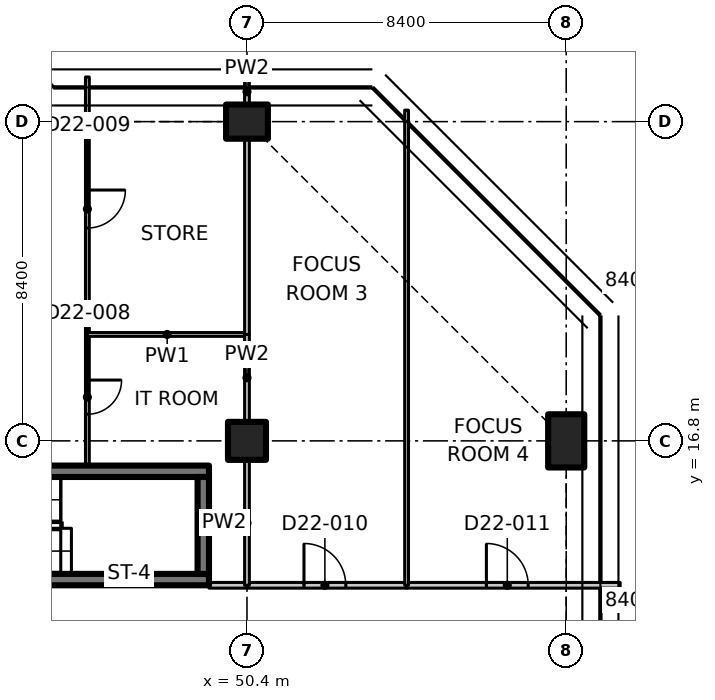
"""IFC4 building model, lengths in metres.
Left out: names, types, materials, properties, quantities, classifications, styles, units other than length and angle.
Written with IfcOpenShell. Run it as: python <this file> out.ifc"""

import sys

from ifc_helpers import new_model, si_unit, direction, frame, frame_2d, origin, origin_2d, place, context, subcontext, project, spatial, polyline, rectangle, outline, extrude, element, fill, save


model = new_model("IFC4")
c1 = context("Model", 3, precision=1e-05, world=origin(), true_north=direction((0.0, 1.0)))
c2 = subcontext(c1, "Body", "Model", "MODEL_VIEW")
j1 = project(units=[si_unit("LENGTHUNIT", "METRE"), si_unit("PLANEANGLEUNIT", "RADIAN")], contexts=[c1])
p1 = place(None, origin())
s1 = spatial("IfcSite", under=j1, at=p1, CompositionType="ELEMENT")
p2 = place(p1, origin())
s2 = spatial("IfcBuilding", under=s1, at=p2, CompositionType="ELEMENT")
p3 = place(p2, frame((0.0, 0.0, 177.6)))
s3 = spatial("IfcBuildingStorey", under=s2, at=p3, CompositionType="ELEMENT", Elevation=177.6)
p4 = place(p3, frame((50.4, 16.8, 0.0), z_axis=(0.0, 0.0, 1.0), x_axis=(1.0, 0.0, 0.0)))
e1 = element("IfcColumn", 1, at=p4, inside=s3, PredefinedType="COLUMN", context=c2, shape_type="SweptSolid", body=[
    extrude(rectangle(XDim=1.0, YDim=1.0, at=origin_2d()), origin(), (0.0, 0.0, 1.0), 3.35),
])
p5 = place(p3, frame((50.4, 25.2, 0.0), z_axis=(0.0, 0.0, 1.0), x_axis=(0.0, 1.0, 0.0)))
e2 = element("IfcColumn", 2, at=p5, inside=s3, PredefinedType="COLUMN", context=c2, shape_type="SweptSolid", body=[
    extrude(rectangle(XDim=0.9, YDim=1.1, at=origin_2d()), origin(), (0.0, 0.0, 1.0), 3.35),
])
p6 = place(p3, frame((58.8, 16.8, 0.0), z_axis=(0.0, 0.0, 1.0), x_axis=(1.0, 0.0, 0.0)))
e3 = element("IfcColumn", 3, at=p6, inside=s3, PredefinedType="COLUMN", context=c2, shape_type="SweptSolid", body=[
    extrude(rectangle(XDim=0.95, YDim=1.4, at=origin_2d()), origin(), (0.0, 0.0, 1.0), 3.35),
])
p7 = place(p3, frame((49.4, 13.15, 0.0), z_axis=(0.0, 0.0, 1.0), x_axis=(-1.0, 0.0, 0.0)))
e4 = element("IfcWall", 4, at=p7, inside=s3, PredefinedType="SHEAR", context=c2, shape_type="SweptSolid", body=[
    extrude(rectangle(XDim=8.2, YDim=0.3, at=frame_2d((4.1, 0.0))), origin(), (0.0, 0.0, 1.0), 3.35),
])
p8 = place(p7, frame((6.8, 0.0, 0.0)))
e5 = element("IfcOpeningElement", 5, at=p8, cuts=e4, PredefinedType="OPENING", context=c2, shape_type="SweptSolid", body=[
    extrude(rectangle(XDim=1.0, YDim=2.1, at=frame_2d((0.5, 1.05))), frame((0.0, 0.16, 0.0), z_axis=(0.0, -1.0, 0.0), x_axis=(1.0, 0.0, 0.0)), (0.0, 0.0, 1.0), 0.32),
])
p9 = place(p3, frame((41.2, 16.0, 0.0), z_axis=(0.0, 0.0, 1.0), x_axis=(1.0, 0.0, 0.0)))
e6 = element("IfcWall", 6, at=p9, inside=s3, PredefinedType="SHEAR", context=c2, shape_type="SweptSolid", body=[
    extrude(rectangle(XDim=8.2, YDim=0.3, at=frame_2d((4.1, 0.0))), origin(), (0.0, 0.0, 1.0), 3.35),
])
p10 = place(p3, frame((49.25, 13.3, 0.0), z_axis=(0.0, 0.0, 1.0), x_axis=(0.0, 1.0, 0.0)))
e7 = element("IfcWall", 7, at=p10, inside=s3, PredefinedType="SHEAR", context=c2, shape_type="SweptSolid", body=[
    extrude(rectangle(XDim=2.55, YDim=0.3, at=frame_2d((1.275, 0.0))), origin(), (0.0, 0.0, 1.0), 3.35),
])
p11 = place(p3, frame((49.4, 13.0, 0.0), z_axis=(0.0, 0.0, 1.0), x_axis=(1.0, 0.0, 0.0)))
e8 = element("IfcWall", 8, at=p11, inside=s3, PredefinedType="PARTITIONING", context=c2, shape_type="SweptSolid", body=[
    extrude(rectangle(XDim=1.0, YDim=0.15, at=frame_2d((0.5, 0.0))), origin(), (0.0, 0.0, 1.0), 3.33),
])
p12 = place(p3, frame((50.4, 13.0, 0.0), z_axis=(0.0, 0.0, 1.0), x_axis=(1.0, 0.0, 0.0)))
e9 = element("IfcWall", 9, at=p12, inside=s3, PredefinedType="PARTITIONING", context=c2, shape_type="SweptSolid", body=[
    extrude(rectangle(XDim=4.2, YDim=0.15, at=frame_2d((2.1, 0.0))), origin(), (0.0, 0.0, 1.0), 3.33),
])
p13 = place(p12, frame((1.5, 0.0, 0.0)))
e10 = element("IfcOpeningElement", 10, at=p13, cuts=e9, PredefinedType="OPENING", context=c2, shape_type="SweptSolid", body=[
    extrude(rectangle(XDim=1.1, YDim=2.1, at=frame_2d((0.55, 1.05))), frame((0.0, 0.085, 0.0), z_axis=(0.0, -1.0, 0.0), x_axis=(1.0, 0.0, 0.0)), (0.0, 0.0, 1.0), 0.17),
])
p14 = place(p3, frame((54.6, 13.0, 0.0), z_axis=(0.0, 0.0, 1.0), x_axis=(1.0, 0.0, 0.0)))
e11 = element("IfcWall", 11, at=p14, inside=s3, PredefinedType="PARTITIONING", context=c2, shape_type="SweptSolid", body=[
    extrude(outline(polyline([(0.0, 0.0), (5.619, 0.0), (5.619, 3.33), (5.28, 3.33), (4.65, 3.33), (4.648, 2.98), (3.752, 2.98), (3.75, 3.33), (0.0, 3.33), (0.0, 0.0)])), frame((0.0, 0.075, 0.0), z_axis=(0.0, -1.0, 0.0), x_axis=(1.0, 0.0, 0.0)), (0.0, 0.0, 1.0), 0.15),
])
p15 = place(p14, frame((2.1, 0.0, 0.0)))
e12 = element("IfcOpeningElement", 12, at=p15, cuts=e11, PredefinedType="OPENING", context=c2, shape_type="SweptSolid", body=[
    extrude(rectangle(XDim=1.1, YDim=2.1, at=frame_2d((0.55, 1.05))), frame((0.0, 0.085, 0.0), z_axis=(0.0, -1.0, 0.0), x_axis=(1.0, 0.0, 0.0)), (0.0, 0.0, 1.0), 0.17),
])
p16 = place(p3, frame((46.2, 19.6, 0.0), z_axis=(0.0, 0.0, 1.0), x_axis=(0.0, -1.0, 0.0)))
e13 = element("IfcWall", 13, at=p16, inside=s3, PredefinedType="PARTITIONING", context=c2, shape_type="SweptSolid", body=[
    extrude(rectangle(XDim=3.45, YDim=0.1, at=frame_2d((1.725, 0.0))), origin(), (0.0, 0.0, 1.0), 3.33),
])
p17 = place(p16, frame((1.2, 0.0, 0.0)))
e14 = element("IfcOpeningElement", 14, at=p17, cuts=e13, PredefinedType="OPENING", context=c2, shape_type="SweptSolid", body=[
    extrude(rectangle(XDim=0.9, YDim=2.1, at=frame_2d((0.45, 1.05))), frame((0.0, 0.06, 0.0), z_axis=(0.0, -1.0, 0.0), x_axis=(1.0, 0.0, 0.0)), (0.0, 0.0, 1.0), 0.12),
])
p18 = place(p3, frame((46.2, 26.374, 0.0), z_axis=(0.0, 0.0, 1.0), x_axis=(0.0, -1.0, 0.0)))
e15 = element("IfcWall", 15, at=p18, inside=s3, PredefinedType="PARTITIONING", context=c2, shape_type="SweptSolid", body=[
    extrude(outline(polyline([(0.0, 0.0), (6.774, 0.0), (6.774, 3.33), (1.624, 3.33), (1.622, 2.98), (0.726, 2.98), (0.724, 3.33), (0.074, 3.33), (0.0, 3.33), (0.0, 0.0)])), frame((0.0, 0.05, 0.0), z_axis=(0.0, -1.0, 0.0), x_axis=(1.0, 0.0, 0.0)), (0.0, 0.0, 1.0), 0.1),
])
p19 = place(p18, frame((2.974, 0.0, 0.0)))
e16 = element("IfcOpeningElement", 16, at=p19, cuts=e15, PredefinedType="OPENING", context=c2, shape_type="SweptSolid", body=[
    extrude(rectangle(XDim=1.0, YDim=2.1, at=frame_2d((0.5, 1.05))), frame((0.0, 0.06, 0.0), z_axis=(0.0, -1.0, 0.0), x_axis=(1.0, 0.0, 0.0)), (0.0, 0.0, 1.0), 0.12),
])
p20 = place(p3, frame((46.2, 19.6, 0.0), z_axis=(0.0, 0.0, 1.0), x_axis=(1.0, 0.0, 0.0)))
e17 = element("IfcWall", 17, at=p20, inside=s3, PredefinedType="PARTITIONING", context=c2, shape_type="SweptSolid", body=[
    extrude(rectangle(XDim=4.2, YDim=0.1, at=frame_2d((2.1, 0.0))), origin(), (0.0, 0.0, 1.0), 3.33),
])
p21 = place(p3, frame((50.4, 19.6, 0.0), z_axis=(0.0, 0.0, 1.0), x_axis=(0.0, -1.0, 0.0)))
e18 = element("IfcWall", 18, at=p21, inside=s3, PredefinedType="PARTITIONING", context=c2, shape_type="SweptSolid", body=[
    extrude(rectangle(XDim=2.28, YDim=0.125, at=frame_2d((1.14, 0.0))), origin(), (0.0, 0.0, 1.0), 3.33),
])
p22 = place(p3, frame((50.4, 16.28, 0.0), z_axis=(0.0, 0.0, 1.0), x_axis=(0.0, -1.0, 0.0)))
e19 = element("IfcWall", 19, at=p22, inside=s3, PredefinedType="PARTITIONING", context=c2, shape_type="SweptSolid", body=[
    extrude(rectangle(XDim=3.28, YDim=0.125, at=frame_2d((1.64, 0.0))), origin(), (0.0, 0.0, 1.0), 3.33),
])
p23 = place(p3, frame((50.4, 26.3, 0.0), z_axis=(0.0, 0.0, 1.0), x_axis=(0.0, -1.0, 0.0)))
e20 = element("IfcWall", 20, at=p23, inside=s3, PredefinedType="PARTITIONING", context=c2, shape_type="SweptSolid", body=[
    extrude(rectangle(XDim=0.63, YDim=0.125, at=frame_2d((0.315, 0.0))), origin(), (0.0, 0.0, 1.0), 3.33),
])
p24 = place(p3, frame((50.4, 24.73, 0.0), z_axis=(0.0, 0.0, 1.0), x_axis=(0.0, -1.0, 0.0)))
e21 = element("IfcWall", 21, at=p24, inside=s3, PredefinedType="PARTITIONING", context=c2, shape_type="SweptSolid", body=[
    extrude(outline(polyline([(0.0, 0.0), (5.13, 0.0), (5.13, 3.33), (0.208, 3.33), (0.206, 2.98), (0.0, 2.98), (0.0, 0.0)])), frame((0.0, 0.062, 0.0), z_axis=(0.0, -1.0, 0.0), x_axis=(1.0, 0.0, 0.0)), (0.0, 0.0, 1.0), 0.125),
])
p25 = place(p3, frame((54.6, 25.502, 0.0), z_axis=(0.0, 0.0, 1.0), x_axis=(0.0, -1.0, 0.0)))
e22 = element("IfcWall", 22, at=p25, inside=s3, PredefinedType="PARTITIONING", context=c2, shape_type="SweptSolid", body=[
    extrude(outline(polyline([(0.0, 0.0), (12.502, 0.0), (12.502, 3.33), (5.168, 3.33), (5.166, 2.98), (3.839, 2.98), (3.837, 3.33), (0.103, 3.33), (0.0, 3.33), (0.0, 0.0)])), frame((0.0, 0.05, 0.0), z_axis=(0.0, -1.0, 0.0), x_axis=(1.0, 0.0, 0.0)), (0.0, 0.0, 1.0), 0.1),
])
p26 = place(p17, origin())
e23 = element("IfcDoor", 23, at=p26, inside=s3, OperationType="SINGLE_SWING_LEFT", PredefinedType="DOOR", context=c2, shape_type="SweptSolid", body=[
    extrude(rectangle(XDim=0.9, YDim=2.1, at=frame_2d((0.45, 1.05))), frame((0.0, 0.025, 0.0), z_axis=(0.0, -1.0, 0.0), x_axis=(1.0, 0.0, 0.0)), (0.0, 0.0, 1.0), 0.05),
])
fill(e14, e23)
p27 = place(p19, origin())
e24 = element("IfcDoor", 24, at=p27, inside=s3, OperationType="SINGLE_SWING_LEFT", PredefinedType="DOOR", context=c2, shape_type="SweptSolid", body=[
    extrude(rectangle(XDim=1.0, YDim=2.1, at=frame_2d((0.5, 1.05))), frame((0.0, 0.025, 0.0), z_axis=(0.0, -1.0, 0.0), x_axis=(1.0, 0.0, 0.0)), (0.0, 0.0, 1.0), 0.05),
])
fill(e16, e24)
p28 = place(p13, origin())
e25 = element("IfcDoor", 25, at=p28, inside=s3, OperationType="SINGLE_SWING_LEFT", PredefinedType="DOOR", context=c2, shape_type="SweptSolid", body=[
    extrude(rectangle(XDim=1.1, YDim=2.1, at=frame_2d((0.55, 1.05))), frame((0.0, 0.025, 0.0), z_axis=(0.0, -1.0, 0.0), x_axis=(1.0, 0.0, 0.0)), (0.0, 0.0, 1.0), 0.05),
])
fill(e10, e25)
p29 = place(p15, origin())
e26 = element("IfcDoor", 26, at=p29, inside=s3, OperationType="SINGLE_SWING_LEFT", PredefinedType="DOOR", context=c2, shape_type="SweptSolid", body=[
    extrude(rectangle(XDim=1.1, YDim=2.1, at=frame_2d((0.55, 1.05))), frame((0.0, 0.025, 0.0), z_axis=(0.0, -1.0, 0.0), x_axis=(1.0, 0.0, 0.0)), (0.0, 0.0, 1.0), 0.05),
])
fill(e12, e26)
save(model, sys.argv[1])
